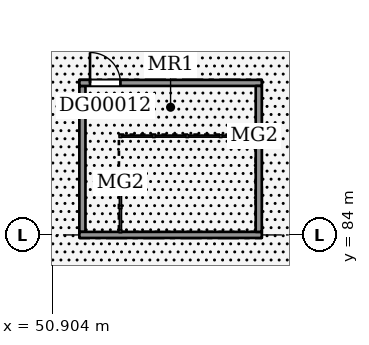
"""IFC4 building model, lengths in metres.
Left out: names, types, materials, properties, quantities, classifications, styles, units other than length and angle.
Written with IfcOpenShell. Run it as: python <this file> out.ifc"""

import sys

from ifc_helpers import new_model, si_unit, direction, frame, frame_2d, origin, place, context, subcontext, project, spatial, rectangle, extrude, element, fill, save


model = new_model("IFC4")
c1 = context("Model", 3, precision=1e-05, world=origin(), true_north=direction((0.0, 1.0)))
c2 = subcontext(c1, "Body", "Model", "MODEL_VIEW")
j1 = project(units=[si_unit("LENGTHUNIT", "METRE"), si_unit("PLANEANGLEUNIT", "RADIAN")], contexts=[c1])
p1 = place(None, origin())
s1 = spatial("IfcSite", under=j1, at=p1, CompositionType="ELEMENT")
p2 = place(p1, origin())
s2 = spatial("IfcBuilding", under=s1, at=p2, CompositionType="ELEMENT")
p3 = place(p2, origin())
s3 = spatial("IfcBuildingStorey", under=s2, at=p3, CompositionType="ELEMENT", Elevation=0.0)
p4 = place(p3, frame((51.9, 84.1, 0.0), z_axis=(0.0, 0.0, 1.0), x_axis=(0.0, 1.0, 0.0)))
e1 = element("IfcWall", 1, at=p4, inside=s3, PredefinedType="SOLIDWALL", context=c2, shape_type="SweptSolid", body=[
    extrude(rectangle(XDim=4.8, YDim=0.2, at=frame_2d((2.4, 0.0))), origin(), (0.0, 0.0, 1.0), 3.6),
])
p5 = place(p3, frame((51.8, 84.0, 0.0), z_axis=(0.0, 0.0, 1.0), x_axis=(1.0, 0.0, 0.0)))
e2 = element("IfcWall", 2, at=p5, inside=s3, PredefinedType="SOLIDWALL", context=c2, shape_type="SweptSolid", body=[
    extrude(rectangle(XDim=6.0, YDim=0.2, at=frame_2d((3.0, 0.0))), origin(), (0.0, 0.0, 1.0), 3.6),
])
p6 = place(p3, frame((51.8, 89.0, 0.0), z_axis=(0.0, 0.0, 1.0), x_axis=(1.0, 0.0, 0.0)))
e3 = element("IfcWall", 3, at=p6, inside=s3, PredefinedType="SOLIDWALL", context=c2, shape_type="SweptSolid", body=[
    extrude(rectangle(XDim=6.0, YDim=0.2, at=frame_2d((3.0, 0.0))), origin(), (0.0, 0.0, 1.0), 3.6),
])
p7 = place(p6, frame((0.35, 0.0, 0.0)))
e4 = element("IfcOpeningElement", 4, at=p7, cuts=e3, PredefinedType="OPENING", context=c2, shape_type="SweptSolid", body=[
    extrude(rectangle(XDim=1.0, YDim=2.1, at=frame_2d((0.5, 1.05))), frame((0.0, 0.11, 0.0), z_axis=(0.0, -1.0, 0.0), x_axis=(1.0, 0.0, 0.0)), (0.0, 0.0, 1.0), 0.22),
])
p8 = place(p3, frame((57.7, 84.1, 0.0), z_axis=(0.0, 0.0, 1.0), x_axis=(0.0, 1.0, 0.0)))
e5 = element("IfcWall", 5, at=p8, inside=s3, PredefinedType="SOLIDWALL", context=c2, shape_type="SweptSolid", body=[
    extrude(rectangle(XDim=4.8, YDim=0.2, at=frame_2d((2.4, 0.0))), origin(), (0.0, 0.0, 1.0), 3.6),
])
p9 = place(p7, origin())
e6 = element("IfcDoor", 6, at=p9, inside=s3, OperationType="SINGLE_SWING_LEFT", PredefinedType="DOOR", context=c2, shape_type="SweptSolid", body=[
    extrude(rectangle(XDim=1.0, YDim=2.1, at=frame_2d((0.5, 1.05))), frame((0.0, 0.025, 0.0), z_axis=(0.0, -1.0, 0.0), x_axis=(1.0, 0.0, 0.0)), (0.0, 0.0, 1.0), 0.05),
])
fill(e4, e6)
save(model, sys.argv[1])
